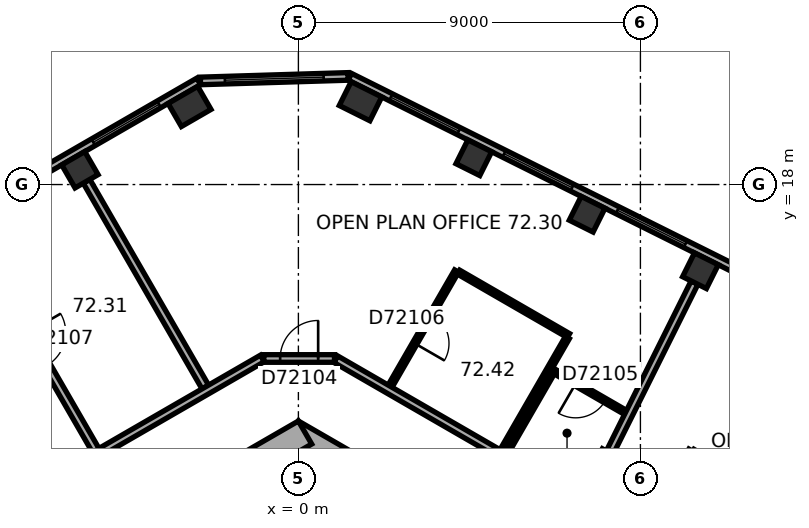
"""IFC4 building model, lengths in metres.
Left out: names, types, materials, properties, quantities, classifications, styles, units other than length and angle.
Written with IfcOpenShell. Run it as: python <this file> out.ifc"""

import sys

from ifc_helpers import new_model, si_unit, direction, frame, frame_2d, origin, origin_2d, place, context, subcontext, project, spatial, rectangle, extrude, element, fill, save


model = new_model("IFC4")
c1 = context("Model", 3, precision=1e-05, world=origin(), true_north=direction((0.0, 1.0)))
c2 = subcontext(c1, "Body", "Model", "MODEL_VIEW")
j1 = project(units=[si_unit("LENGTHUNIT", "METRE"), si_unit("PLANEANGLEUNIT", "RADIAN")], contexts=[c1])
p1 = place(None, origin())
s1 = spatial("IfcSite", under=j1, at=p1, CompositionType="ELEMENT")
p2 = place(p1, origin())
s2 = spatial("IfcBuilding", under=s1, at=p2, CompositionType="ELEMENT")
p3 = place(p2, frame((0.0, 0.0, 293.1)))
s3 = spatial("IfcBuildingStorey", under=s2, at=p3, CompositionType="ELEMENT", Elevation=293.1)
for number, where, z_axis, x_axis in (
    (1, (10.58, 15.732, 0.0), (0.0, 0.0, 1.0), (-0.895, 0.446, 0.0)),
    (2, (7.598, 17.219, 0.0), (0.0, 0.0, 1.0), (-0.895, 0.446, 0.0)),
    (3, (4.616, 18.706, 0.0), (0.0, 0.0, 1.0), (-0.895, 0.446, 0.0)),
):
    element("IfcColumn", number, at=place(p3, frame(where, z_axis=z_axis, x_axis=x_axis)), inside=s3, PredefinedType="COLUMN", context=c2, shape_type="SweptSolid", body=[
        extrude(rectangle(XDim=0.7, YDim=0.7, at=origin_2d()), origin(), (0.0, 0.0, 1.0), 3.7),
    ])
for number, where, z_axis, x_axis in (
    (4, (1.635, 20.192, 0.0), (0.0, 0.0, 1.0), (-0.895, 0.446, 0.0)),
    (5, (-2.864, 20.055, 0.0), (0.0, 0.0, 1.0), (-0.866, -0.5, 0.0)),
):
    element("IfcColumn", number, at=place(p3, frame(where, z_axis=z_axis, x_axis=x_axis)), inside=s3, PredefinedType="COLUMN", context=c2, shape_type="SweptSolid", body=[
        extrude(rectangle(XDim=0.9, YDim=0.7, at=origin_2d()), origin(), (0.0, 0.0, 1.0), 3.7),
    ])
p4 = place(p3, frame((-5.75, 18.389, 0.0), z_axis=(0.0, 0.0, 1.0), x_axis=(-0.866025403784, -0.5, 0.0)))
e6 = element("IfcColumn", 6, at=p4, inside=s3, PredefinedType="COLUMN", context=c2, shape_type="SweptSolid", body=[
    extrude(rectangle(XDim=0.7, YDim=0.7, at=origin_2d()), origin(), (0.0, 0.0, 1.0), 3.7),
])
p5 = place(p3, frame((10.025, 5.586, 0.0), z_axis=(0.0, 0.0, 1.0), x_axis=(-0.866026453023, 0.499998182661, 0.0)))
e7 = element("IfcWall", 7, at=p5, inside=s3, PredefinedType="SHEAR", context=c2, shape_type="SweptSolid", body=[
    extrude(rectangle(XDim=11.778, YDim=0.7, at=frame_2d((5.889, 0.0))), origin(), (0.0, 0.0, 1.0), 3.7),
])
p6 = place(p5, frame((5.139, 0.0, 0.0)))
e8 = element("IfcOpeningElement", 8, at=p6, cuts=e7, PredefinedType="OPENING", context=c2, shape_type="SweptSolid", body=[
    extrude(rectangle(XDim=0.9, YDim=2.1, at=frame_2d((0.45, 1.05))), frame((0.0, 0.36, 0.0), z_axis=(0.0, -1.0, 0.0), x_axis=(1.0, 0.0, 0.0)), (0.0, 0.0, 1.0), 0.72),
])
p7 = place(p3, frame((0.175, 11.475, 0.0), z_axis=(0.0, 0.0, 1.0), x_axis=(-0.866026453023, -0.499998182661, 0.0)))
e9 = element("IfcWall", 9, at=p7, inside=s3, PredefinedType="SHEAR", context=c2, shape_type="SweptSolid", body=[
    extrude(rectangle(XDim=11.778, YDim=0.7, at=frame_2d((5.889, 0.0))), origin(), (0.0, 0.0, 1.0), 3.7),
])
p8 = place(p7, frame((6.089, 0.0, 0.0)))
e10 = element("IfcOpeningElement", 10, at=p8, cuts=e9, PredefinedType="OPENING", context=c2, shape_type="SweptSolid", body=[
    extrude(rectangle(XDim=1.5, YDim=2.1, at=frame_2d((0.75, 1.05))), frame((0.0, 0.36, 0.0), z_axis=(0.0, -1.0, 0.0), x_axis=(1.0, 0.0, 0.0)), (0.0, 0.0, 1.0), 0.72),
])
p9 = place(p7, frame((2.939, 0.0, 0.0)))
e11 = element("IfcOpeningElement", 11, at=p9, cuts=e9, PredefinedType="OPENING", context=c2, shape_type="SweptSolid", body=[
    extrude(rectangle(XDim=0.9, YDim=2.1, at=frame_2d((0.45, 1.05))), frame((0.0, 0.36, 0.0), z_axis=(0.0, -1.0, 0.0), x_axis=(1.0, 0.0, 0.0)), (0.0, 0.0, 1.0), 0.72),
])
p10 = place(p3, frame((17.223, 12.923, 0.0), z_axis=(0.0, 0.0, 1.0), x_axis=(-0.894930561148, 0.44620543556, 0.0)))
e12 = element("IfcWall", 12, at=p10, inside=s3, PredefinedType="STANDARD", context=c2, shape_type="SweptSolid", body=[
    extrude(rectangle(XDim=17.731, YDim=0.2, at=frame_2d((8.866, 0.0))), origin(), (0.0, 0.0, 1.0), 3.7),
])
p11 = place(p10, frame((1.202, 0.0, 0.9)))
e13 = element("IfcOpeningElement", 13, at=p11, cuts=e12, PredefinedType="OPENING", context=c2, shape_type="SweptSolid", body=[
    extrude(rectangle(XDim=2.0, YDim=2.0, at=frame_2d((1.0, 1.0))), frame((0.0, 0.11, 0.0), z_axis=(0.0, -1.0, 0.0), x_axis=(1.0, 0.0, 0.0)), (0.0, 0.0, 1.0), 0.22),
])
p12 = place(p10, frame((4.533, 0.0, 0.9)))
e14 = element("IfcOpeningElement", 14, at=p12, cuts=e12, PredefinedType="OPENING", context=c2, shape_type="SweptSolid", body=[
    extrude(rectangle(XDim=2.0, YDim=2.0, at=frame_2d((1.0, 1.0))), frame((0.0, 0.11, 0.0), z_axis=(0.0, -1.0, 0.0), x_axis=(1.0, 0.0, 0.0)), (0.0, 0.0, 1.0), 0.22),
])
p13 = place(p10, frame((7.865, 0.0, 0.9)))
e15 = element("IfcOpeningElement", 15, at=p13, cuts=e12, PredefinedType="OPENING", context=c2, shape_type="SweptSolid", body=[
    extrude(rectangle(XDim=2.0, YDim=2.0, at=frame_2d((1.0, 1.0))), frame((0.0, 0.11, 0.0), z_axis=(0.0, -1.0, 0.0), x_axis=(1.0, 0.0, 0.0)), (0.0, 0.0, 1.0), 0.22),
])
p14 = place(p10, frame((11.197, 0.0, 0.9)))
e16 = element("IfcOpeningElement", 16, at=p14, cuts=e12, PredefinedType="OPENING", context=c2, shape_type="SweptSolid", body=[
    extrude(rectangle(XDim=2.0, YDim=2.0, at=frame_2d((1.0, 1.0))), frame((0.0, 0.11, 0.0), z_axis=(0.0, -1.0, 0.0), x_axis=(1.0, 0.0, 0.0)), (0.0, 0.0, 1.0), 0.22),
])
p15 = place(p10, frame((14.528, 0.0, 0.9)))
e17 = element("IfcOpeningElement", 17, at=p15, cuts=e12, PredefinedType="OPENING", context=c2, shape_type="SweptSolid", body=[
    extrude(rectangle(XDim=2.0, YDim=2.0, at=frame_2d((1.0, 1.0))), frame((0.0, 0.11, 0.0), z_axis=(0.0, -1.0, 0.0), x_axis=(1.0, 0.0, 0.0)), (0.0, 0.0, 1.0), 0.22),
])
p16 = place(p3, frame((1.307, 20.845, 0.0), z_axis=(0.0, 0.0, 1.0), x_axis=(-0.999533654813, -0.030536419175, 0.0)))
e18 = element("IfcWall", 18, at=p16, inside=s3, PredefinedType="STANDARD", context=c2, shape_type="SweptSolid", body=[
    extrude(rectangle(XDim=3.885, YDim=0.2, at=frame_2d((1.943, 0.0))), origin(), (0.0, 0.0, 1.0), 3.7),
])
p17 = place(p16, frame((0.643, 0.0, 0.9)))
e19 = element("IfcOpeningElement", 19, at=p17, cuts=e18, PredefinedType="OPENING", context=c2, shape_type="SweptSolid", body=[
    extrude(rectangle(XDim=2.6, YDim=2.0, at=frame_2d((1.3, 1.0))), frame((0.0, 0.11, 0.0), z_axis=(0.0, -1.0, 0.0), x_axis=(1.0, 0.0, 0.0)), (0.0, 0.0, 1.0), 0.22),
])
p18 = place(p3, frame((-2.624, 20.713, 0.0), z_axis=(0.0, 0.0, 1.0), x_axis=(-0.866026460444, -0.499998169808, 0.0)))
e20 = element("IfcWall", 20, at=p18, inside=s3, PredefinedType="STANDARD", context=c2, shape_type="SweptSolid", body=[
    extrude(rectangle(XDim=17.731, YDim=0.2, at=frame_2d((8.866, 0.0))), origin(), (0.0, 0.0, 1.0), 3.7),
])
p19 = place(p18, frame((1.203, 0.0, 0.9)))
e21 = element("IfcOpeningElement", 21, at=p19, cuts=e20, PredefinedType="OPENING", context=c2, shape_type="SweptSolid", body=[
    extrude(rectangle(XDim=2.0, YDim=2.0, at=frame_2d((1.0, 1.0))), frame((0.0, 0.11, 0.0), z_axis=(0.0, -1.0, 0.0), x_axis=(1.0, 0.0, 0.0)), (0.0, 0.0, 1.0), 0.22),
])
p20 = place(p18, frame((4.535, 0.0, 0.9)))
e22 = element("IfcOpeningElement", 22, at=p20, cuts=e20, PredefinedType="OPENING", context=c2, shape_type="SweptSolid", body=[
    extrude(rectangle(XDim=2.0, YDim=2.0, at=frame_2d((1.0, 1.0))), frame((0.0, 0.11, 0.0), z_axis=(0.0, -1.0, 0.0), x_axis=(1.0, 0.0, 0.0)), (0.0, 0.0, 1.0), 0.22),
])
p21 = place(p18, frame((7.867, 0.0, 0.9)))
e23 = element("IfcOpeningElement", 23, at=p21, cuts=e20, PredefinedType="OPENING", context=c2, shape_type="SweptSolid", body=[
    extrude(rectangle(XDim=2.0, YDim=2.0, at=frame_2d((1.0, 1.0))), frame((0.0, 0.11, 0.0), z_axis=(0.0, -1.0, 0.0), x_axis=(1.0, 0.0, 0.0)), (0.0, 0.0, 1.0), 0.22),
])
p22 = place(p18, frame((11.198, 0.0, 0.9)))
e24 = element("IfcOpeningElement", 24, at=p22, cuts=e20, PredefinedType="OPENING", context=c2, shape_type="SweptSolid", body=[
    extrude(rectangle(XDim=2.0, YDim=2.0, at=frame_2d((1.0, 1.0))), frame((0.0, 0.11, 0.0), z_axis=(0.0, -1.0, 0.0), x_axis=(1.0, 0.0, 0.0)), (0.0, 0.0, 1.0), 0.22),
])
p23 = place(p18, frame((14.53, 0.0, 0.9)))
e25 = element("IfcOpeningElement", 25, at=p23, cuts=e20, PredefinedType="OPENING", context=c2, shape_type="SweptSolid", body=[
    extrude(rectangle(XDim=2.0, YDim=2.0, at=frame_2d((1.0, 1.0))), frame((0.0, 0.11, 0.0), z_axis=(0.0, -1.0, 0.0), x_axis=(1.0, 0.0, 0.0)), (0.0, 0.0, 1.0), 0.22),
])
p24 = place(p3, frame((-8.46, 16.42, 0.0), z_axis=(0.0, 0.0, 1.0), x_axis=(0.500005339912, -0.866022320763, 0.0)))
e26 = element("IfcWall", 26, at=p24, inside=s3, PredefinedType="PARTITIONING", context=c2, shape_type="SweptSolid", body=[
    extrude(rectangle(XDim=6.35, YDim=0.2, at=frame_2d((3.175, 0.0))), origin(), (0.0, 0.0, 1.0), 2.87),
])
p25 = place(p24, frame((2.675, 0.0, 0.0)))
e27 = element("IfcOpeningElement", 27, at=p25, cuts=e26, PredefinedType="OPENING", context=c2, shape_type="SweptSolid", body=[
    extrude(rectangle(XDim=1.0, YDim=2.1, at=frame_2d((0.5, 1.05))), frame((0.0, 0.11, 0.0), z_axis=(0.0, -1.0, 0.0), x_axis=(1.0, 0.0, 0.0)), (0.0, 0.0, 1.0), 0.22),
])
p26 = place(p3, frame((-5.575, 18.086, 0.0), z_axis=(0.0, 0.0, 1.0), x_axis=(0.500004234368, -0.866022959057, 0.0)))
e28 = element("IfcWall", 28, at=p26, inside=s3, PredefinedType="PARTITIONING", context=c2, shape_type="SweptSolid", body=[
    extrude(rectangle(XDim=6.25, YDim=0.2, at=frame_2d((3.125, 0.0))), origin(), (0.0, 0.0, 1.0), 3.42),
])
p27 = place(p3, frame((-0.95, 13.423, 0.0), z_axis=(0.0, 0.0, 1.0), x_axis=(-0.86603557629, -0.499982380289, 0.0)))
e29 = element("IfcWall", 29, at=p27, inside=s3, PredefinedType="PARTITIONING", context=c2, shape_type="SweptSolid", body=[
    extrude(rectangle(XDim=4.906, YDim=0.2, at=frame_2d((2.453, 0.0))), origin(), (0.0, 0.0, 1.0), 3.42),
])
p28 = place(p3, frame((0.95, 13.423, 0.0), z_axis=(0.0, 0.0, 1.0), x_axis=(-1.0, 0.0, 0.0)))
e30 = element("IfcWall", 30, at=p28, inside=s3, PredefinedType="PARTITIONING", context=c2, shape_type="SweptSolid", body=[
    extrude(rectangle(XDim=1.86, YDim=0.2, at=frame_2d((0.93, 0.0))), origin(), (0.0, 0.0, 1.0), 3.42),
])
p29 = place(p28, frame((0.43, 0.0, 0.0)))
e31 = element("IfcOpeningElement", 31, at=p29, cuts=e30, PredefinedType="OPENING", context=c2, shape_type="SweptSolid", body=[
    extrude(rectangle(XDim=1.0, YDim=2.1, at=frame_2d((0.5, 1.05))), frame((0.0, 0.11, 0.0), z_axis=(0.0, -1.0, 0.0), x_axis=(1.0, 0.0, 0.0)), (0.0, 0.0, 1.0), 0.22),
])
p30 = place(p3, frame((2.413, 12.694, 0.0), z_axis=(0.0, 0.0, 1.0), x_axis=(0.500010275428, 0.866019471182, 0.0)))
e32 = element("IfcWall", 32, at=p30, inside=s3, PredefinedType="PARTITIONING", context=c2, shape_type="SweptSolid", body=[
    extrude(rectangle(XDim=3.5, YDim=0.12, at=frame_2d((1.75, 0.0))), origin(), (0.0, 0.0, 1.0), 3.42),
])
p31 = place(p30, frame((1.3, 0.0, 0.0)))
e33 = element("IfcOpeningElement", 33, at=p31, cuts=e32, PredefinedType="OPENING", context=c2, shape_type="SweptSolid", body=[
    extrude(rectangle(XDim=0.9, YDim=2.1, at=frame_2d((0.45, 1.05))), frame((0.0, 0.07, 0.0), z_axis=(0.0, -1.0, 0.0), x_axis=(1.0, 0.0, 0.0)), (0.0, 0.0, 1.0), 0.14),
])
p32 = place(p3, frame((4.215, 15.695, 0.0), z_axis=(0.0, 0.0, 1.0), x_axis=(0.865989591418, -0.50006202371, 0.0)))
e34 = element("IfcWall", 34, at=p32, inside=s3, PredefinedType="PARTITIONING", context=c2, shape_type="SweptSolid", body=[
    extrude(rectangle(XDim=3.34, YDim=0.12, at=frame_2d((1.67, 0.0))), origin(), (0.0, 0.0, 1.0), 3.42),
])
p33 = place(p3, frame((5.308, 10.907, 0.0), z_axis=(0.0, 0.0, 1.0), x_axis=(-0.866028394472, 0.499994819941, 0.0)))
e35 = element("IfcWall", 35, at=p33, inside=s3, PredefinedType="PARTITIONING", context=c2, shape_type="SweptSolid", body=[
    extrude(rectangle(XDim=4.992, YDim=0.2, at=frame_2d((2.496, 0.0))), origin(), (0.0, 0.0, 1.0), 3.42),
])
p34 = place(p3, frame((5.461, 10.934, 0.0), z_axis=(0.0, 0.0, 1.0), x_axis=(0.500004234368, 0.866022959057, 0.0)))
e36 = element("IfcWall", 36, at=p34, inside=s3, PredefinedType="PARTITIONING", context=c2, shape_type="SweptSolid", body=[
    extrude(rectangle(XDim=2.5, YDim=0.12, at=frame_2d((1.25, 0.0))), origin(), (0.0, 0.0, 1.0), 3.42),
])
p35 = place(p3, frame((6.763, 13.069, 0.0), z_axis=(0.0, 0.0, 1.0), x_axis=(0.866019511163, -0.500010206181, 0.0)))
e37 = element("IfcWall", 37, at=p35, inside=s3, PredefinedType="PARTITIONING", context=c2, shape_type="SweptSolid", body=[
    extrude(rectangle(XDim=2.13, YDim=0.12, at=frame_2d((1.065, 0.0))), origin(), (0.0, 0.0, 1.0), 3.42),
])
p36 = place(p35, frame((0.615, 0.0, 0.0)))
e38 = element("IfcOpeningElement", 38, at=p36, cuts=e37, PredefinedType="OPENING", context=c2, shape_type="SweptSolid", body=[
    extrude(rectangle(XDim=0.9, YDim=2.1, at=frame_2d((0.45, 1.05))), frame((0.0, 0.07, 0.0), z_axis=(0.0, -1.0, 0.0), x_axis=(1.0, 0.0, 0.0)), (0.0, 0.0, 1.0), 0.14),
])
p37 = place(p3, frame((7.077, 13.973, 0.0), z_axis=(0.0, 0.0, 1.0), x_axis=(-0.499955923987, -0.866050849587, 0.0)))
e39 = element("IfcWall", 39, at=p37, inside=s3, PredefinedType="PARTITIONING", context=c2, shape_type="SweptSolid", body=[
    extrude(rectangle(XDim=3.44, YDim=0.12, at=frame_2d((1.72, 0.0))), origin(), (0.0, 0.0, 1.0), 3.42),
])
p38 = place(p3, frame((10.423, 15.419, 0.0), z_axis=(0.0, 0.0, 1.0), x_axis=(-0.446202606517, -0.894931971681, 0.0)))
e40 = element("IfcWall", 40, at=p38, inside=s3, PredefinedType="PARTITIONING", context=c2, shape_type="SweptSolid", body=[
    extrude(rectangle(XDim=6.377, YDim=0.2, at=frame_2d((3.188, 0.0))), origin(), (0.0, 0.0, 1.0), 2.87),
])
p39 = place(p13, origin())
e41 = element("IfcWindow", 41, at=p39, inside=s3, PartitioningType="SINGLE_PANEL", PredefinedType="WINDOW", context=c2, shape_type="SweptSolid", body=[
    extrude(rectangle(XDim=2.0, YDim=2.0, at=frame_2d((1.0, 1.0))), frame((0.0, 0.03, 0.0), z_axis=(0.0, -1.0, 0.0), x_axis=(1.0, 0.0, 0.0)), (0.0, 0.0, 1.0), 0.06),
])
fill(e15, e41)
p40 = place(p14, origin())
e42 = element("IfcWindow", 42, at=p40, inside=s3, PartitioningType="SINGLE_PANEL", PredefinedType="WINDOW", context=c2, shape_type="SweptSolid", body=[
    extrude(rectangle(XDim=2.0, YDim=2.0, at=frame_2d((1.0, 1.0))), frame((0.0, 0.03, 0.0), z_axis=(0.0, -1.0, 0.0), x_axis=(1.0, 0.0, 0.0)), (0.0, 0.0, 1.0), 0.06),
])
fill(e16, e42)
p41 = place(p15, origin())
e43 = element("IfcWindow", 43, at=p41, inside=s3, PartitioningType="SINGLE_PANEL", PredefinedType="WINDOW", context=c2, shape_type="SweptSolid", body=[
    extrude(rectangle(XDim=2.0, YDim=2.0, at=frame_2d((1.0, 1.0))), frame((0.0, 0.03, 0.0), z_axis=(0.0, -1.0, 0.0), x_axis=(1.0, 0.0, 0.0)), (0.0, 0.0, 1.0), 0.06),
])
fill(e17, e43)
p42 = place(p17, origin())
e44 = element("IfcWindow", 44, at=p42, inside=s3, PartitioningType="SINGLE_PANEL", PredefinedType="WINDOW", context=c2, shape_type="SweptSolid", body=[
    extrude(rectangle(XDim=2.6, YDim=2.0, at=frame_2d((1.3, 1.0))), frame((0.0, 0.03, 0.0), z_axis=(0.0, -1.0, 0.0), x_axis=(1.0, 0.0, 0.0)), (0.0, 0.0, 1.0), 0.06),
])
fill(e19, e44)
p43 = place(p19, origin())
e45 = element("IfcWindow", 45, at=p43, inside=s3, PartitioningType="SINGLE_PANEL", PredefinedType="WINDOW", context=c2, shape_type="SweptSolid", body=[
    extrude(rectangle(XDim=2.0, YDim=2.0, at=frame_2d((1.0, 1.0))), frame((0.0, 0.03, 0.0), z_axis=(0.0, -1.0, 0.0), x_axis=(1.0, 0.0, 0.0)), (0.0, 0.0, 1.0), 0.06),
])
fill(e21, e45)
p44 = place(p29, origin())
e46 = element("IfcDoor", 46, at=p44, inside=s3, OperationType="SINGLE_SWING_LEFT", PredefinedType="DOOR", context=c2, shape_type="SweptSolid", body=[
    extrude(rectangle(XDim=1.0, YDim=2.1, at=frame_2d((0.5, 1.05))), frame((0.0, 0.025, 0.0), z_axis=(0.0, -1.0, 0.0), x_axis=(1.0, 0.0, 0.0)), (0.0, 0.0, 1.0), 0.05),
])
fill(e31, e46)
p45 = place(p36, origin())
e47 = element("IfcDoor", 47, at=p45, inside=s3, OperationType="SINGLE_SWING_LEFT", PredefinedType="DOOR", context=c2, shape_type="SweptSolid", body=[
    extrude(rectangle(XDim=0.9, YDim=2.1, at=frame_2d((0.45, 1.05))), frame((0.0, 0.025, 0.0), z_axis=(0.0, -1.0, 0.0), x_axis=(1.0, 0.0, 0.0)), (0.0, 0.0, 1.0), 0.05),
])
fill(e38, e47)
p46 = place(p31, origin())
e48 = element("IfcDoor", 48, at=p46, inside=s3, OperationType="SINGLE_SWING_LEFT", PredefinedType="DOOR", context=c2, shape_type="SweptSolid", body=[
    extrude(rectangle(XDim=0.9, YDim=2.1, at=frame_2d((0.45, 1.05))), frame((0.0, 0.025, 0.0), z_axis=(0.0, -1.0, 0.0), x_axis=(1.0, 0.0, 0.0)), (0.0, 0.0, 1.0), 0.05),
])
fill(e33, e48)
save(model, sys.argv[1])
